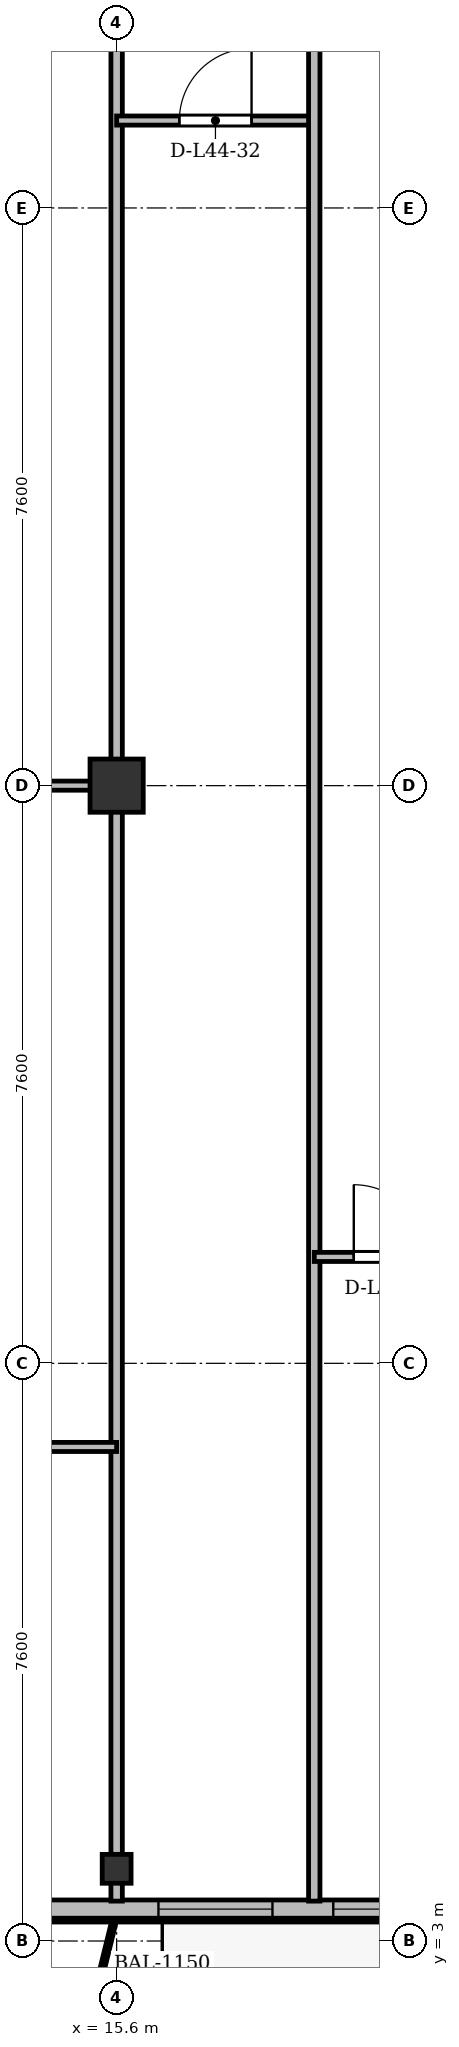
"""IFC4 building model, lengths in metres.
Left out: names, types, materials, properties, quantities, classifications, styles, units other than length and angle.
Written with IfcOpenShell. Run it as: python <this file> out.ifc"""

import sys

from ifc_helpers import new_model, si_unit, direction, frame, frame_2d, origin, origin_2d, place, context, subcontext, project, spatial, rectangle, i_section, extrude, source, transform, mapped, element, fill, save


model = new_model("IFC4")
c1 = context("Model", 3, precision=1e-05, world=origin(), true_north=direction((0.0, 1.0)))
c2 = subcontext(c1, "Body", "Model", "MODEL_VIEW")
j1 = project(units=[si_unit("LENGTHUNIT", "METRE"), si_unit("PLANEANGLEUNIT", "RADIAN")], contexts=[c1])
p1 = place(None, origin())
s1 = spatial("IfcSite", under=j1, at=p1, CompositionType="ELEMENT")
p2 = place(p1, origin())
s2 = spatial("IfcBuilding", under=s1, at=p2, CompositionType="ELEMENT")
p3 = place(p2, frame((0.0, 0.0, 168.1)))
s3 = spatial("IfcBuildingStorey", under=s2, at=p3, CompositionType="ELEMENT", Elevation=168.1)
m1 = source(origin(), c2, "Body", "SweptSolid", [
    extrude(i_section(OverallWidth=0.38, OverallDepth=0.38, WebThickness=0.02, FlangeThickness=0.03, at=origin_2d()), origin(), (0.0, 0.0, 1.0), 3.6),
])
p4 = place(p3, frame((15.6, 3.95, 0.0), z_axis=(0.0, 0.0, 1.0), x_axis=(1.0, 0.0, 0.0)))
e1 = element("IfcColumn", 1, at=p4, inside=s3, PredefinedType="COLUMN", context=c2, shape_type="MappedRepresentation", body=[
    mapped(m1, transform((0.0, 0.0, 0.0), x_axis=(1.0, 0.0, 0.0), y_axis=(0.0, 1.0, 0.0), z_axis=(0.0, 0.0, 1.0), scale=1.0)),
])
m2 = source(origin(), c2, "Body", "SweptSolid", [
    extrude(rectangle(XDim=0.7, YDim=0.7, at=origin_2d()), origin(), (0.0, 0.0, 1.0), 3.6),
])
p5 = place(p3, frame((15.6, 18.2, 0.0), z_axis=(0.0, 0.0, 1.0), x_axis=(1.0, 0.0, 0.0)))
e2 = element("IfcColumn", 2, at=p5, inside=s3, PredefinedType="COLUMN", context=c2, shape_type="MappedRepresentation", body=[
    mapped(m2, transform((0.0, 0.0, 0.0), x_axis=(1.0, 0.0, 0.0), y_axis=(0.0, 1.0, 0.0), z_axis=(0.0, 0.0, 1.0), scale=1.0)),
])
p6 = place(p3, frame((63.6, 3.42, 0.0), z_axis=(0.0, 0.0, 1.0), x_axis=(-1.0, 0.0, 0.0)))
e3 = element("IfcWall", 3, at=p6, inside=s3, PredefinedType="SOLIDWALL", context=c2, shape_type="SweptSolid", body=[
    extrude(rectangle(XDim=52.8, YDim=0.24, at=frame_2d((26.4, 0.0))), origin(), (0.0, 0.0, 1.0), 3.35),
])
p7 = place(p6, frame((1.62, 0.0, 0.9)))
e4 = element("IfcOpeningElement", 4, at=p7, cuts=e3, PredefinedType="OPENING", context=c2, shape_type="SweptSolid", body=[
    extrude(rectangle(XDim=1.65, YDim=1.85, at=frame_2d((0.825, 0.925))), frame((0.0, 0.13, 0.0), z_axis=(0.0, -1.0, 0.0), x_axis=(1.0, 0.0, 0.0)), (0.0, 0.0, 1.0), 0.26),
])
p8 = place(p6, frame((5.2, 0.0, 0.9)))
e5 = element("IfcOpeningElement", 5, at=p8, cuts=e3, PredefinedType="OPENING", context=c2, shape_type="SweptSolid", body=[
    extrude(rectangle(XDim=1.8, YDim=1.8, at=frame_2d((0.9, 0.9))), frame((0.0, 0.13, 0.0), z_axis=(0.0, -1.0, 0.0), x_axis=(1.0, 0.0, 0.0)), (0.0, 0.0, 1.0), 0.26),
])
p9 = place(p6, frame((7.65, 0.0, 0.9)))
e6 = element("IfcOpeningElement", 6, at=p9, cuts=e3, PredefinedType="OPENING", context=c2, shape_type="SweptSolid", body=[
    extrude(rectangle(XDim=1.5, YDim=1.75, at=frame_2d((0.75, 0.875))), frame((0.0, 0.13, 0.0), z_axis=(0.0, -1.0, 0.0), x_axis=(1.0, 0.0, 0.0)), (0.0, 0.0, 1.0), 0.26),
])
p10 = place(p6, frame((10.25, 0.0, 0.9)))
e7 = element("IfcOpeningElement", 7, at=p10, cuts=e3, PredefinedType="OPENING", context=c2, shape_type="SweptSolid", body=[
    extrude(rectangle(XDim=1.5, YDim=1.75, at=frame_2d((0.75, 0.875))), frame((0.0, 0.13, 0.0), z_axis=(0.0, -1.0, 0.0), x_axis=(1.0, 0.0, 0.0)), (0.0, 0.0, 1.0), 0.26),
])
p11 = place(p6, frame((13.62, 0.0, 0.0)))
e8 = element("IfcOpeningElement", 8, at=p11, cuts=e3, PredefinedType="OPENING", context=c2, shape_type="SweptSolid", body=[
    extrude(rectangle(XDim=1.2, YDim=2.2, at=frame_2d((0.6, 1.1))), frame((0.0, 0.13, 0.0), z_axis=(0.0, -1.0, 0.0), x_axis=(1.0, 0.0, 0.0)), (0.0, 0.0, 1.0), 0.26),
])
p12 = place(p6, frame((15.375, 0.0, 0.9)))
e9 = element("IfcOpeningElement", 9, at=p12, cuts=e3, PredefinedType="OPENING", context=c2, shape_type="SweptSolid", body=[
    extrude(rectangle(XDim=1.65, YDim=1.85, at=frame_2d((0.825, 0.925))), frame((0.0, 0.13, 0.0), z_axis=(0.0, -1.0, 0.0), x_axis=(1.0, 0.0, 0.0)), (0.0, 0.0, 1.0), 0.26),
])
p13 = place(p6, frame((17.7, 0.0, 0.9)))
e10 = element("IfcOpeningElement", 10, at=p13, cuts=e3, PredefinedType="OPENING", context=c2, shape_type="SweptSolid", body=[
    extrude(rectangle(XDim=1.8, YDim=1.8, at=frame_2d((0.9, 0.9))), frame((0.0, 0.13, 0.0), z_axis=(0.0, -1.0, 0.0), x_axis=(1.0, 0.0, 0.0)), (0.0, 0.0, 1.0), 0.26),
])
p14 = place(p6, frame((22.0, 0.0, 0.9)))
e11 = element("IfcOpeningElement", 11, at=p14, cuts=e3, PredefinedType="OPENING", context=c2, shape_type="SweptSolid", body=[
    extrude(rectangle(XDim=2.2, YDim=1.8, at=frame_2d((1.1, 0.9))), frame((0.0, 0.13, 0.0), z_axis=(0.0, -1.0, 0.0), x_axis=(1.0, 0.0, 0.0)), (0.0, 0.0, 1.0), 0.26),
])
p15 = place(p6, frame((28.95, 0.0, 0.9)))
e12 = element("IfcOpeningElement", 12, at=p15, cuts=e3, PredefinedType="OPENING", context=c2, shape_type="SweptSolid", body=[
    extrude(rectangle(XDim=1.5, YDim=1.75, at=frame_2d((0.75, 0.875))), frame((0.0, 0.13, 0.0), z_axis=(0.0, -1.0, 0.0), x_axis=(1.0, 0.0, 0.0)), (0.0, 0.0, 1.0), 0.26),
])
p16 = place(p6, frame((35.6, 0.0, 0.9)))
e13 = element("IfcOpeningElement", 13, at=p16, cuts=e3, PredefinedType="OPENING", context=c2, shape_type="SweptSolid", body=[
    extrude(rectangle(XDim=2.0, YDim=1.95, at=frame_2d((1.0, 0.975))), frame((0.0, 0.13, 0.0), z_axis=(0.0, -1.0, 0.0), x_axis=(1.0, 0.0, 0.0)), (0.0, 0.0, 1.0), 0.26),
])
p17 = place(p6, frame((41.656, 0.0, 0.0)))
e14 = element("IfcOpeningElement", 14, at=p17, cuts=e3, PredefinedType="OPENING", context=c2, shape_type="SweptSolid", body=[
    extrude(rectangle(XDim=1.2, YDim=2.2, at=frame_2d((0.6, 1.1))), frame((0.0, 0.13, 0.0), z_axis=(0.0, -1.0, 0.0), x_axis=(1.0, 0.0, 0.0)), (0.0, 0.0, 1.0), 0.26),
])
p18 = place(p6, frame((43.65, 0.0, 0.9)))
e15 = element("IfcOpeningElement", 15, at=p18, cuts=e3, PredefinedType="OPENING", context=c2, shape_type="SweptSolid", body=[
    extrude(rectangle(XDim=1.5, YDim=1.75, at=frame_2d((0.75, 0.875))), frame((0.0, 0.13, 0.0), z_axis=(0.0, -1.0, 0.0), x_axis=(1.0, 0.0, 0.0)), (0.0, 0.0, 1.0), 0.26),
])
p19 = place(p6, frame((45.95, 0.0, 0.9)))
e16 = element("IfcOpeningElement", 16, at=p19, cuts=e3, PredefinedType="OPENING", context=c2, shape_type="SweptSolid", body=[
    extrude(rectangle(XDim=1.5, YDim=1.75, at=frame_2d((0.75, 0.875))), frame((0.0, 0.13, 0.0), z_axis=(0.0, -1.0, 0.0), x_axis=(1.0, 0.0, 0.0)), (0.0, 0.0, 1.0), 0.26),
])
p20 = place(p6, frame((49.605, 0.0, 0.9)))
e17 = element("IfcOpeningElement", 17, at=p20, cuts=e3, PredefinedType="OPENING", context=c2, shape_type="SweptSolid", body=[
    extrude(rectangle(XDim=1.5, YDim=1.75, at=frame_2d((0.75, 0.875))), frame((0.0, 0.13, 0.0), z_axis=(0.0, -1.0, 0.0), x_axis=(1.0, 0.0, 0.0)), (0.0, 0.0, 1.0), 0.26),
])
p21 = place(p3, frame((15.6, 3.525, 0.0), z_axis=(0.0, 0.0, 1.0), x_axis=(0.0, 1.0, 0.0)))
e18 = element("IfcWall", 18, at=p21, inside=s3, PredefinedType="PARTITIONING", context=c2, shape_type="SweptSolid", body=[
    extrude(rectangle(XDim=27.275, YDim=0.15, at=frame_2d((13.638, 0.0))), origin(), (0.0, 0.0, 1.0), 2.85),
])
p22 = place(p3, frame((8.04, 18.2, 0.0), z_axis=(0.0, 0.0, 1.0), x_axis=(1.0, 0.0, 0.0)))
e19 = element("IfcWall", 19, at=p22, inside=s3, PredefinedType="PARTITIONING", context=c2, shape_type="SweptSolid", body=[
    extrude(rectangle(XDim=7.56, YDim=0.12, at=frame_2d((3.78, 0.0))), origin(), (0.0, 0.0, 1.0), 2.75),
])
p23 = place(p22, frame((3.305, 0.0, 0.0)))
e20 = element("IfcOpeningElement", 20, at=p23, cuts=e19, PredefinedType="OPENING", context=c2, shape_type="SweptSolid", body=[
    extrude(rectangle(XDim=0.95, YDim=2.15, at=frame_2d((0.475, 1.075))), frame((0.0, 0.07, 0.0), z_axis=(0.0, -1.0, 0.0), x_axis=(1.0, 0.0, 0.0)), (0.0, 0.0, 1.0), 0.14),
])
p24 = place(p3, frame((8.04, 9.5, 0.0), z_axis=(0.0, 0.0, 1.0), x_axis=(1.0, 0.0, 0.0)))
e21 = element("IfcWall", 21, at=p24, inside=s3, PredefinedType="PARTITIONING", context=c2, shape_type="SweptSolid", body=[
    extrude(rectangle(XDim=7.56, YDim=0.12, at=frame_2d((3.78, 0.0))), origin(), (0.0, 0.0, 1.0), 2.85),
])
p25 = place(p24, frame((3.305, 0.0, 0.0)))
e22 = element("IfcOpeningElement", 22, at=p25, cuts=e21, PredefinedType="OPENING", context=c2, shape_type="SweptSolid", body=[
    extrude(rectangle(XDim=0.95, YDim=2.15, at=frame_2d((0.475, 1.075))), frame((0.0, 0.07, 0.0), z_axis=(0.0, -1.0, 0.0), x_axis=(1.0, 0.0, 0.0)), (0.0, 0.0, 1.0), 0.14),
])
p26 = place(p3, frame((15.6, 26.95, 0.0), z_axis=(0.0, 0.0, 1.0), x_axis=(1.0, 0.0, 0.0)))
e23 = element("IfcWall", 23, at=p26, inside=s3, PredefinedType="PARTITIONING", context=c2, shape_type="SweptSolid", body=[
    extrude(rectangle(XDim=2.6, YDim=0.12, at=frame_2d((1.3, 0.0))), origin(), (0.0, 0.0, 1.0), 2.85),
])
p27 = place(p26, frame((0.825, 0.0, 0.0)))
e24 = element("IfcOpeningElement", 24, at=p27, cuts=e23, PredefinedType="OPENING", context=c2, shape_type="SweptSolid", body=[
    extrude(rectangle(XDim=0.95, YDim=2.15, at=frame_2d((0.475, 1.075))), frame((0.0, 0.07, 0.0), z_axis=(0.0, -1.0, 0.0), x_axis=(1.0, 0.0, 0.0)), (0.0, 0.0, 1.0), 0.14),
])
p28 = place(p3, frame((18.2, 3.525, 0.0), z_axis=(0.0, 0.0, 1.0), x_axis=(0.0, 1.0, 0.0)))
e25 = element("IfcWall", 25, at=p28, inside=s3, PredefinedType="PARTITIONING", context=c2, shape_type="SweptSolid", body=[
    extrude(rectangle(XDim=27.275, YDim=0.15, at=frame_2d((13.638, 0.0))), origin(), (0.0, 0.0, 1.0), 2.75),
])
p29 = place(p3, frame((18.2, 12.0, 0.0), z_axis=(0.0, 0.0, 1.0), x_axis=(1.0, 0.0, 0.0)))
e26 = element("IfcWall", 26, at=p29, inside=s3, PredefinedType="PARTITIONING", context=c2, shape_type="SweptSolid", body=[
    extrude(rectangle(XDim=2.0, YDim=0.12, at=frame_2d((1.0, 0.0))), origin(), (0.0, 0.0, 1.0), 3.35),
])
p30 = place(p29, frame((0.52, 0.0, 0.0)))
e27 = element("IfcOpeningElement", 27, at=p30, cuts=e26, PredefinedType="OPENING", context=c2, shape_type="SweptSolid", body=[
    extrude(rectangle(XDim=0.95, YDim=2.15, at=frame_2d((0.475, 1.075))), frame((0.0, 0.07, 0.0), z_axis=(0.0, -1.0, 0.0), x_axis=(1.0, 0.0, 0.0)), (0.0, 0.0, 1.0), 0.14),
])
m3 = source(origin(), c2, "Body", "SweptSolid", [
    extrude(rectangle(XDim=1.5, YDim=1.75, at=frame_2d((0.75, 0.875))), frame((0.0, 0.03, 0.0), z_axis=(0.0, -1.0, 0.0), x_axis=(1.0, 0.0, 0.0)), (0.0, 0.0, 1.0), 0.06),
])
p31 = place(p18, origin())
e28 = element("IfcWindow", 28, at=p31, inside=s3, PartitioningType="SINGLE_PANEL", PredefinedType="WINDOW", context=c2, shape_type="MappedRepresentation", body=[
    mapped(m3, transform((0.0, 0.0, 0.0), x_axis=(1.0, 0.0, 0.0), y_axis=(0.0, 1.0, 0.0), z_axis=(0.0, 0.0, 1.0), scale=1.0)),
])
fill(e15, e28)
p32 = place(p19, origin())
e29 = element("IfcWindow", 29, at=p32, inside=s3, PartitioningType="SINGLE_PANEL", PredefinedType="WINDOW", context=c2, shape_type="MappedRepresentation", body=[
    mapped(m3, transform((0.0, 0.0, 0.0), x_axis=(1.0, 0.0, 0.0), y_axis=(0.0, 1.0, 0.0), z_axis=(0.0, 0.0, 1.0), scale=1.0)),
])
fill(e16, e29)
m4 = source(origin(), c2, "Body", "SweptSolid", [
    extrude(rectangle(XDim=0.95, YDim=2.15, at=frame_2d((0.475, 1.075))), frame((0.0, 0.025, 0.0), z_axis=(0.0, -1.0, 0.0), x_axis=(1.0, 0.0, 0.0)), (0.0, 0.0, 1.0), 0.05),
])
p33 = place(p27, origin())
e30 = element("IfcDoor", 30, at=p33, inside=s3, OperationType="SINGLE_SWING_RIGHT", PredefinedType="DOOR", context=c2, shape_type="MappedRepresentation", body=[
    mapped(m4, transform((0.0, 0.0, 0.0), x_axis=(1.0, 0.0, 0.0), y_axis=(0.0, 1.0, 0.0), z_axis=(0.0, 0.0, 1.0), scale=1.0)),
])
fill(e24, e30)
p34 = place(p30, origin())
e31 = element("IfcDoor", 31, at=p34, inside=s3, OperationType="SINGLE_SWING_LEFT", PredefinedType="DOOR", context=c2, shape_type="MappedRepresentation", body=[
    mapped(m4, transform((0.0, 0.0, 0.0), x_axis=(1.0, 0.0, 0.0), y_axis=(0.0, 1.0, 0.0), z_axis=(0.0, 0.0, 1.0), scale=1.0)),
])
fill(e27, e31)
save(model, sys.argv[1])
